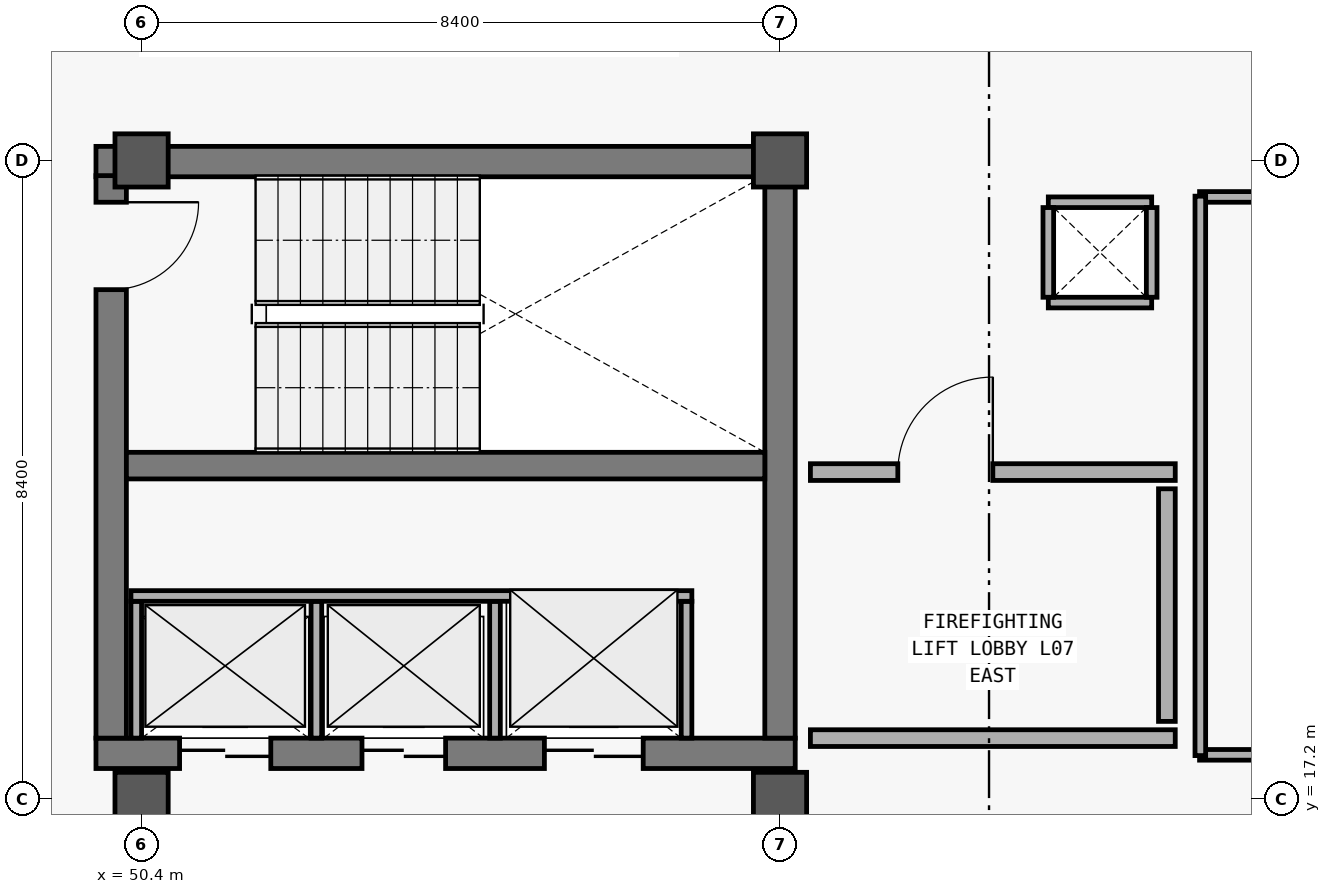
"""IFC4 building model, lengths in metres.
Left out: names, types, materials, properties, quantities, classifications, styles, units other than length and angle.
Written with IfcOpenShell. Run it as: python <this file> out.ifc"""

import sys

from ifc_helpers import new_model, si_unit, direction, frame, frame_2d, origin, origin_2d, place, context, subcontext, project, spatial, rectangle, extrude, element, fill, save


model = new_model("IFC4")
c1 = context("Model", 3, precision=1e-05, world=origin(), true_north=direction((0.0, 1.0)))
c2 = subcontext(c1, "Body", "Model", "MODEL_VIEW")
j1 = project(units=[si_unit("LENGTHUNIT", "METRE"), si_unit("PLANEANGLEUNIT", "RADIAN")], contexts=[c1])
p1 = place(None, origin())
s1 = spatial("IfcSite", under=j1, at=p1, CompositionType="ELEMENT")
p2 = place(p1, origin())
s2 = spatial("IfcBuilding", under=s1, at=p2, CompositionType="ELEMENT")
p3 = place(p2, frame((0.0, 0.0, 30.0)))
s3 = spatial("IfcBuildingStorey", under=s2, at=p3, CompositionType="ELEMENT", Elevation=30.0)
for number, where, z_axis, x_axis in (
    (1, (50.4, 17.2, 0.0), (0.0, 0.0, 1.0), (1.0, 0.0, 0.0)),
    (2, (50.4, 25.6, 0.0), (0.0, 0.0, 1.0), (1.0, 0.0, 0.0)),
    (3, (58.8, 17.2, 0.0), (0.0, 0.0, 1.0), (1.0, 0.0, 0.0)),
    (4, (58.8, 25.6, 0.0), (0.0, 0.0, 1.0), (1.0, 0.0, 0.0)),
):
    element("IfcColumn", number, at=place(p3, frame(where, z_axis=z_axis, x_axis=x_axis)), inside=s3, PredefinedType="COLUMN", context=c2, shape_type="SweptSolid", body=[
        extrude(rectangle(XDim=0.7, YDim=0.7, at=origin_2d()), origin(), (0.0, 0.0, 1.0), 3.6),
    ])
p4 = place(p3, frame((49.8, 17.8, 0.0), z_axis=(0.0, 0.0, 1.0), x_axis=(1.0, 0.0, 0.0)))
e5 = element("IfcWall", 5, at=p4, inside=s3, PredefinedType="SHEAR", context=c2, shape_type="SweptSolid", body=[
    extrude(rectangle(XDim=9.2, YDim=0.4, at=frame_2d((4.6, 0.0))), origin(), (0.0, 0.0, 1.0), 3.32),
])
p5 = place(p4, frame((1.1, 0.0, 0.0)))
e6 = element("IfcOpeningElement", 6, at=p5, cuts=e5, PredefinedType="OPENING", context=c2, shape_type="SweptSolid", body=[
    extrude(rectangle(XDim=1.2, YDim=2.2, at=frame_2d((0.6, 1.1))), frame((0.0, 0.21, 0.0), z_axis=(0.0, -1.0, 0.0), x_axis=(1.0, 0.0, 0.0)), (0.0, 0.0, 1.0), 0.42),
])
p6 = place(p4, frame((3.5, 0.0, 0.0)))
e7 = element("IfcOpeningElement", 7, at=p6, cuts=e5, PredefinedType="OPENING", context=c2, shape_type="SweptSolid", body=[
    extrude(rectangle(XDim=1.1, YDim=2.2, at=frame_2d((0.55, 1.1))), frame((0.0, 0.21, 0.0), z_axis=(0.0, -1.0, 0.0), x_axis=(1.0, 0.0, 0.0)), (0.0, 0.0, 1.0), 0.42),
])
p7 = place(p4, frame((5.9, 0.0, 0.0)))
e8 = element("IfcOpeningElement", 8, at=p7, cuts=e5, PredefinedType="OPENING", context=c2, shape_type="SweptSolid", body=[
    extrude(rectangle(XDim=1.3, YDim=2.3, at=frame_2d((0.65, 1.15))), frame((0.0, 0.21, 0.0), z_axis=(0.0, -1.0, 0.0), x_axis=(1.0, 0.0, 0.0)), (0.0, 0.0, 1.0), 0.42),
])
p8 = place(p3, frame((59.0, 25.585, 0.0), z_axis=(0.0, 0.0, 1.0), x_axis=(-1.0, 0.0, 0.0)))
e9 = element("IfcWall", 9, at=p8, inside=s3, PredefinedType="SHEAR", context=c2, shape_type="SweptSolid", body=[
    extrude(rectangle(XDim=9.2, YDim=0.4, at=frame_2d((4.6, 0.0))), origin(), (0.0, 0.0, 1.0), 3.32),
])
p9 = place(p3, frame((50.0, 25.4, 0.0), z_axis=(0.0, 0.0, 1.0), x_axis=(0.0, -1.0, 0.0)))
e10 = element("IfcWall", 10, at=p9, inside=s3, PredefinedType="SHEAR", context=c2, shape_type="SweptSolid", body=[
    extrude(rectangle(XDim=7.4, YDim=0.4, at=frame_2d((3.7, 0.0))), origin(), (0.0, 0.0, 1.0), 3.32),
])
p10 = place(p9, frame((0.35, 0.0, 0.0)))
e11 = element("IfcOpeningElement", 11, at=p10, cuts=e10, PredefinedType="OPENING", context=c2, shape_type="SweptSolid", body=[
    extrude(rectangle(XDim=1.15, YDim=2.2, at=frame_2d((0.575, 1.1))), frame((0.0, 0.21, 0.0), z_axis=(0.0, -1.0, 0.0), x_axis=(1.0, 0.0, 0.0)), (0.0, 0.0, 1.0), 0.42),
])
p11 = place(p3, frame((58.8, 18.0, 0.0), z_axis=(0.0, 0.0, 1.0), x_axis=(0.0, 1.0, 0.0)))
e12 = element("IfcWall", 12, at=p11, inside=s3, PredefinedType="SHEAR", context=c2, shape_type="SweptSolid", body=[
    extrude(rectangle(XDim=7.4, YDim=0.4, at=frame_2d((3.7, 0.0))), origin(), (0.0, 0.0, 1.0), 3.32),
])
p12 = place(p3, frame((50.2, 21.585, 0.0), z_axis=(0.0, 0.0, 1.0), x_axis=(1.0, 0.0, 0.0)))
e13 = element("IfcWall", 13, at=p12, inside=s3, PredefinedType="SHEAR", context=c2, shape_type="SweptSolid", body=[
    extrude(rectangle(XDim=8.4, YDim=0.35, at=frame_2d((4.2, 0.0))), origin(), (0.0, 0.0, 1.0), 3.32),
])
for number, where, z_axis, x_axis in (
    (14, (50.33, 18.0, 0.0), (0.0, 0.0, 1.0), (0.0, 1.0, 0.0)),
    (15, (52.7, 18.0, 0.0), (0.0, 0.0, 1.0), (0.0, 1.0, 0.0)),
    (16, (55.05, 18.0, 0.0), (0.0, 0.0, 1.0), (0.0, 1.0, 0.0)),
    (17, (57.57, 18.0, 0.0), (0.0, 0.0, 1.0), (0.0, 1.0, 0.0)),
):
    element("IfcWall", number, at=place(p3, frame(where, z_axis=z_axis, x_axis=x_axis)), inside=s3, PredefinedType="PARTITIONING", context=c2, shape_type="SweptSolid", body=[
        extrude(rectangle(XDim=1.8, YDim=0.14, at=frame_2d((0.9, 0.0))), origin(), (0.0, 0.0, 1.0), 2.47),
    ])
p13 = place(p3, frame((50.26, 19.87, 0.0), z_axis=(0.0, 0.0, 1.0), x_axis=(1.0, 0.0, 0.0)))
e18 = element("IfcWall", 18, at=p13, inside=s3, PredefinedType="PARTITIONING", context=c2, shape_type="SweptSolid", body=[
    extrude(rectangle(XDim=7.38, YDim=0.14, at=frame_2d((3.69, 0.0))), origin(), (0.0, 0.0, 1.0), 2.47),
])
p14 = place(p3, frame((59.2, 18.0, 0.0), z_axis=(0.0, 0.0, 1.0), x_axis=(1.0, 0.0, 0.0)))
e19 = element("IfcWall", 19, at=p14, inside=s3, PredefinedType="SOLIDWALL", context=c2, shape_type="SweptSolid", body=[
    extrude(rectangle(XDim=4.8, YDim=0.22, at=frame_2d((2.4, 0.0))), origin(), (0.0, 0.0, 1.0), 2.47),
])
p15 = place(p3, frame((59.2, 21.5, 0.0), z_axis=(0.0, 0.0, 1.0), x_axis=(1.0, 0.0, 0.0)))
e20 = element("IfcWall", 20, at=p15, inside=s3, PredefinedType="SOLIDWALL", context=c2, shape_type="SweptSolid", body=[
    extrude(rectangle(XDim=4.8, YDim=0.22, at=frame_2d((2.4, 0.0))), origin(), (0.0, 0.0, 1.0), 2.47),
])
p16 = place(p15, frame((1.15, 0.0, 0.0)))
e21 = element("IfcOpeningElement", 21, at=p16, cuts=e20, PredefinedType="OPENING", context=c2, shape_type="SweptSolid", body=[
    extrude(rectangle(XDim=1.25, YDim=2.2, at=frame_2d((0.625, 1.1))), frame((0.0, 0.12, 0.0), z_axis=(0.0, -1.0, 0.0), x_axis=(1.0, 0.0, 0.0)), (0.0, 0.0, 1.0), 0.24),
])
p17 = place(p3, frame((63.89, 18.22, 0.0), z_axis=(0.0, 0.0, 1.0), x_axis=(0.0, 1.0, 0.0)))
e22 = element("IfcWall", 22, at=p17, inside=s3, PredefinedType="SOLIDWALL", context=c2, shape_type="SweptSolid", body=[
    extrude(rectangle(XDim=3.06, YDim=0.22, at=frame_2d((1.53, 0.0))), origin(), (0.0, 0.0, 1.0), 2.47),
])
p18 = place(p3, frame((64.32, 17.78, 0.0), z_axis=(0.0, 0.0, 1.0), x_axis=(1.0, 0.0, 0.0)))
e23 = element("IfcWall", 23, at=p18, inside=s3, PredefinedType="PARTITIONING", context=c2, shape_type="SweptSolid", body=[
    extrude(rectangle(XDim=11.0, YDim=0.14, at=frame_2d((5.5, 0.0))), origin(), (0.0, 0.0, 1.0), 2.48),
])
p19 = place(p18, frame((5.958, 0.0, 0.0)))
e24 = element("IfcOpeningElement", 24, at=p19, cuts=e23, PredefinedType="OPENING", context=c2, shape_type="SweptSolid", body=[
    extrude(rectangle(XDim=1.08, YDim=2.25, at=frame_2d((0.54, 1.125))), frame((0.0, 0.08, 0.0), z_axis=(0.0, -1.0, 0.0), x_axis=(1.0, 0.0, 0.0)), (0.0, 0.0, 1.0), 0.16),
])
p20 = place(p3, frame((64.32, 25.12, 0.0), z_axis=(0.0, 0.0, 1.0), x_axis=(1.0, 0.0, 0.0)))
e25 = element("IfcWall", 25, at=p20, inside=s3, PredefinedType="PARTITIONING", context=c2, shape_type="SweptSolid", body=[
    extrude(rectangle(XDim=11.0, YDim=0.14, at=frame_2d((5.5, 0.0))), origin(), (0.0, 0.0, 1.0), 2.48),
])
p21 = place(p3, frame((64.33, 17.77, 0.0), z_axis=(0.0, 0.0, 1.0), x_axis=(0.0, 1.0, 0.0)))
e26 = element("IfcWall", 26, at=p21, inside=s3, PredefinedType="PARTITIONING", context=c2, shape_type="SweptSolid", body=[
    extrude(rectangle(XDim=7.36, YDim=0.14, at=frame_2d((3.68, 0.0))), origin(), (0.0, 0.0, 1.0), 2.48),
])
for number, where, z_axis, x_axis in (
    (27, (62.33, 23.73, 0.0), (0.0, 0.0, 1.0), (1.0, 0.0, 0.0)),
    (28, (63.69, 25.05, 0.0), (0.0, 0.0, 1.0), (-1.0, 0.0, 0.0)),
):
    element("IfcWall", number, at=place(p3, frame(where, z_axis=z_axis, x_axis=x_axis)), inside=s3, PredefinedType="PARTITIONING", context=c2, shape_type="SweptSolid", body=[
        extrude(rectangle(XDim=1.36, YDim=0.14, at=frame_2d((0.68, 0.0))), origin(), (0.0, 0.0, 1.0), 2.44),
    ])
for number, where, z_axis, x_axis in (
    (29, (62.33, 24.98, 0.0), (0.0, 0.0, 1.0), (0.0, -1.0, 0.0)),
    (30, (63.69, 23.8, 0.0), (0.0, 0.0, 1.0), (0.0, 1.0, 0.0)),
):
    element("IfcWall", number, at=place(p3, frame(where, z_axis=z_axis, x_axis=x_axis)), inside=s3, PredefinedType="PARTITIONING", context=c2, shape_type="SweptSolid", body=[
        extrude(rectangle(XDim=1.18, YDim=0.14, at=frame_2d((0.59, 0.0))), origin(), (0.0, 0.0, 1.0), 2.44),
    ])
p22 = place(p10, origin())
e31 = element("IfcDoor", 31, at=p22, inside=s3, OperationType="SINGLE_SWING_LEFT", PredefinedType="DOOR", context=c2, shape_type="SweptSolid", body=[
    extrude(rectangle(XDim=1.15, YDim=2.2, at=frame_2d((0.575, 1.1))), frame((0.0, 0.025, 0.0), z_axis=(0.0, -1.0, 0.0), x_axis=(1.0, 0.0, 0.0)), (0.0, 0.0, 1.0), 0.05),
])
fill(e11, e31)
p23 = place(p5, origin())
e32 = element("IfcDoor", 32, at=p23, inside=s3, OperationType="DOUBLE_DOOR_SLIDING", PredefinedType="DOOR", context=c2, shape_type="SweptSolid", body=[
    extrude(rectangle(XDim=1.2, YDim=2.2, at=frame_2d((0.6, 1.1))), frame((0.0, 0.025, 0.0), z_axis=(0.0, -1.0, 0.0), x_axis=(1.0, 0.0, 0.0)), (0.0, 0.0, 1.0), 0.05),
])
fill(e6, e32)
p24 = place(p6, origin())
e33 = element("IfcDoor", 33, at=p24, inside=s3, OperationType="DOUBLE_DOOR_SLIDING", PredefinedType="DOOR", context=c2, shape_type="SweptSolid", body=[
    extrude(rectangle(XDim=1.1, YDim=2.2, at=frame_2d((0.55, 1.1))), frame((0.0, 0.025, 0.0), z_axis=(0.0, -1.0, 0.0), x_axis=(1.0, 0.0, 0.0)), (0.0, 0.0, 1.0), 0.05),
])
fill(e7, e33)
p25 = place(p7, origin())
e34 = element("IfcDoor", 34, at=p25, inside=s3, OperationType="DOUBLE_DOOR_SLIDING", PredefinedType="DOOR", context=c2, shape_type="SweptSolid", body=[
    extrude(rectangle(XDim=1.3, YDim=2.3, at=frame_2d((0.65, 1.15))), frame((0.0, 0.025, 0.0), z_axis=(0.0, -1.0, 0.0), x_axis=(1.0, 0.0, 0.0)), (0.0, 0.0, 1.0), 0.05),
])
fill(e8, e34)
p26 = place(p16, origin())
e35 = element("IfcDoor", 35, at=p26, inside=s3, OperationType="SINGLE_SWING_RIGHT", PredefinedType="DOOR", context=c2, shape_type="SweptSolid", body=[
    extrude(rectangle(XDim=1.25, YDim=2.2, at=frame_2d((0.625, 1.1))), frame((0.0, 0.025, 0.0), z_axis=(0.0, -1.0, 0.0), x_axis=(1.0, 0.0, 0.0)), (0.0, 0.0, 1.0), 0.05),
])
fill(e21, e35)
save(model, sys.argv[1])
